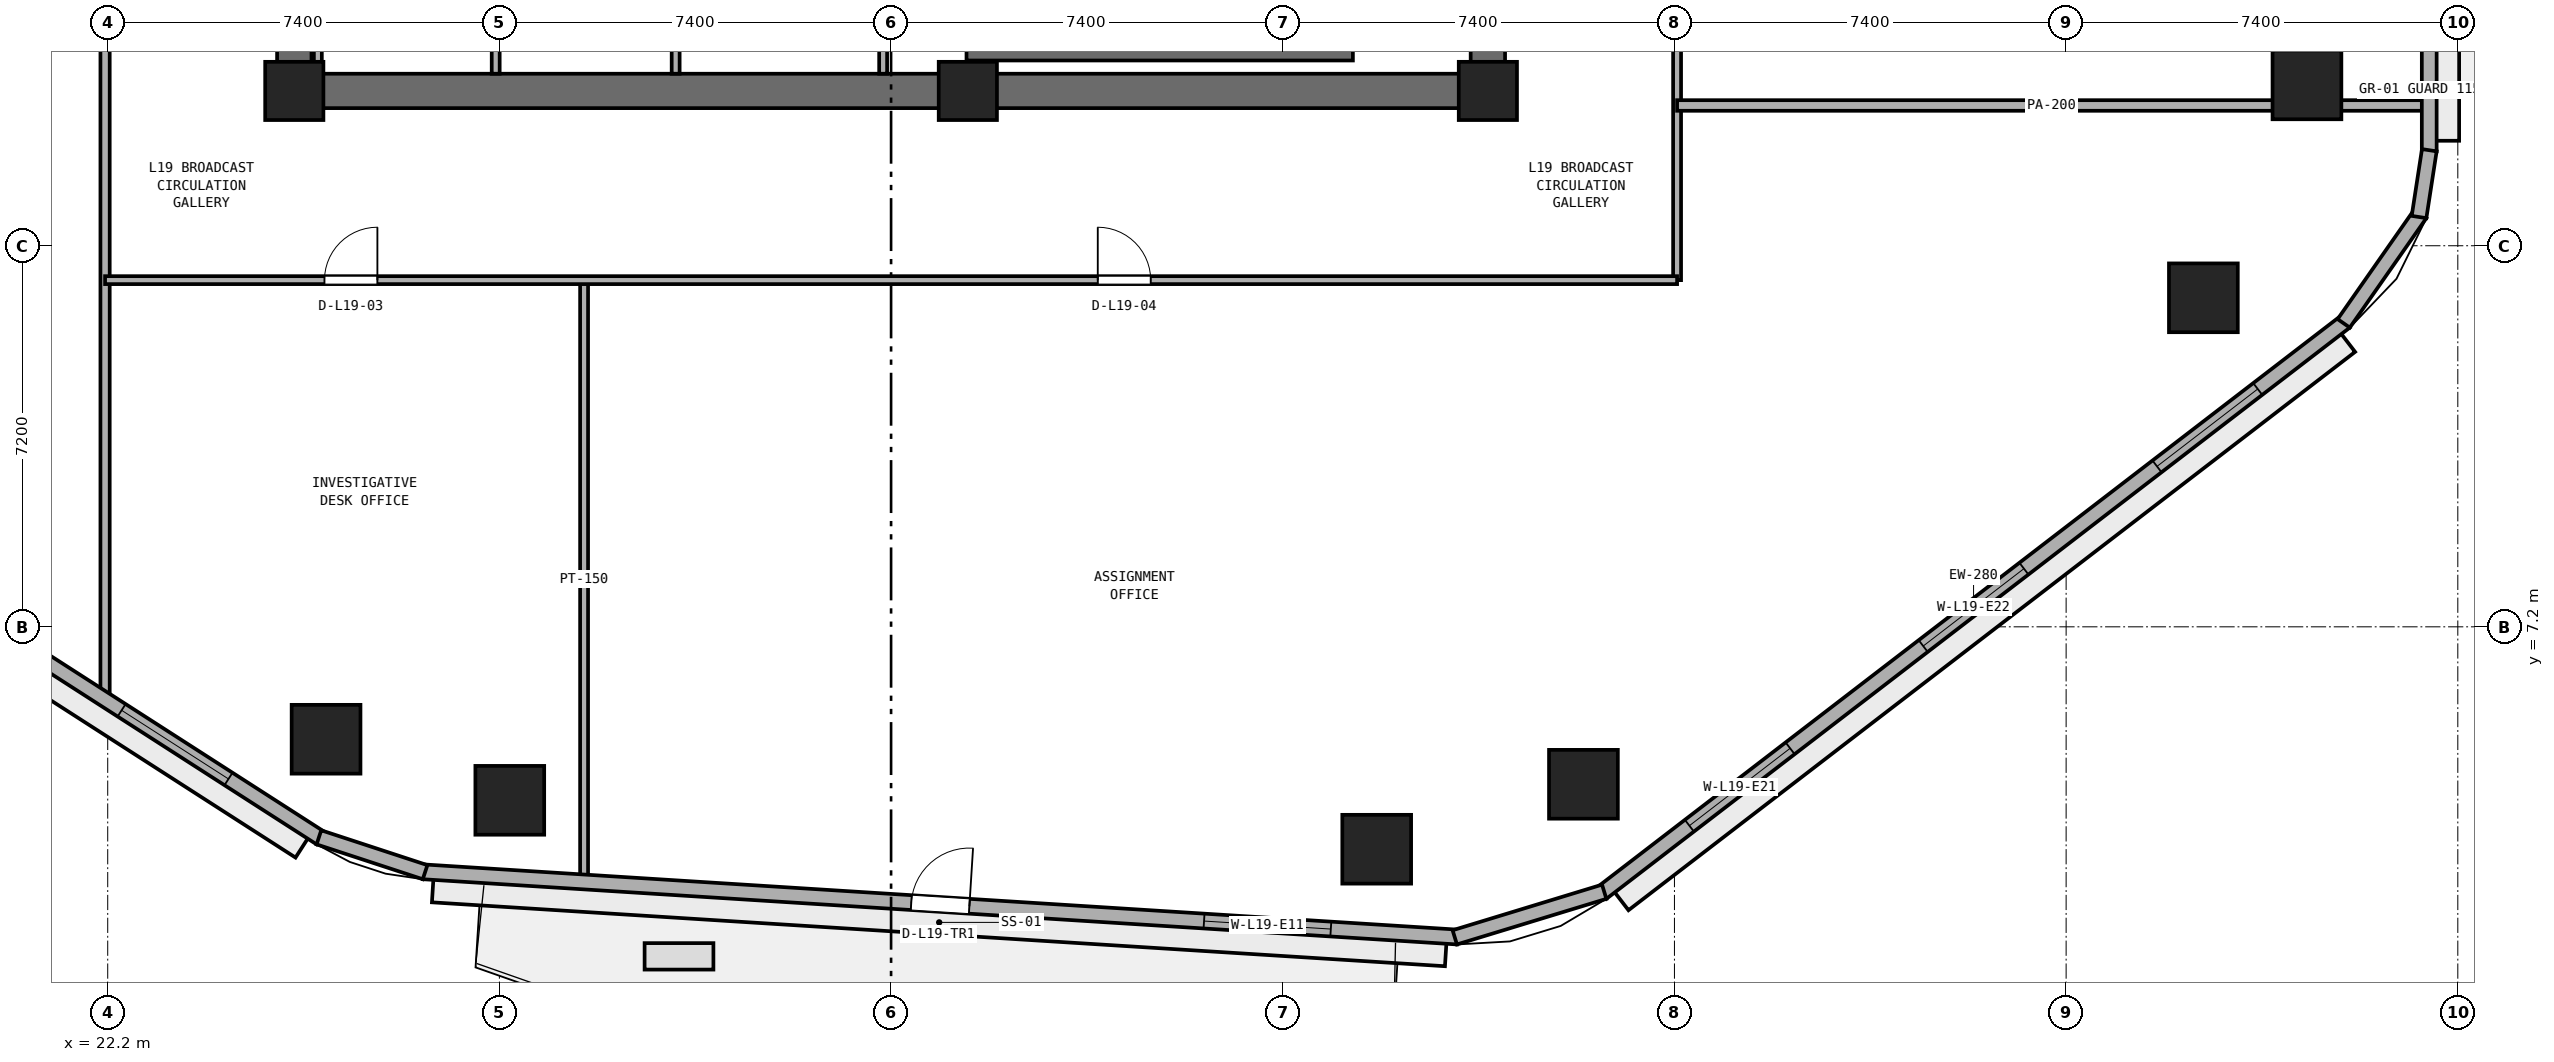
"""IFC4 building model, lengths in metres.
Left out: names, types, materials, properties, quantities, classifications, styles, units other than length and angle.
Written with IfcOpenShell. Run it as: python <this file> out.ifc"""

import sys

from ifc_helpers import new_model, si_unit, direction, frame, frame_2d, origin, origin_2d, place, context, subcontext, project, spatial, rectangle, extrude, element, fill, save


model = new_model("IFC4")
c1 = context("Model", 3, precision=1e-05, world=origin(), true_north=direction((0.0, 1.0)))
c2 = subcontext(c1, "Body", "Model", "MODEL_VIEW")
j1 = project(units=[si_unit("LENGTHUNIT", "METRE"), si_unit("PLANEANGLEUNIT", "RADIAN")], contexts=[c1])
p1 = place(None, origin())
s1 = spatial("IfcSite", under=j1, at=p1, CompositionType="ELEMENT")
p2 = place(p1, origin())
s2 = spatial("IfcBuilding", under=s1, at=p2, CompositionType="ELEMENT")
p3 = place(p2, frame((0.0, 0.0, 78.2)))
s3 = spatial("IfcBuildingStorey", under=s2, at=p3, CompositionType="ELEMENT", Elevation=78.2)
p4 = place(p3, frame((25.4, 17.325, 0.0), z_axis=(0.0, 0.0, 1.0), x_axis=(1.0, 0.0, 0.0)))
e1 = element("IfcWall", 1, at=p4, inside=s3, PredefinedType="SHEAR", context=c2, shape_type="SweptSolid", body=[
    extrude(rectangle(XDim=23.2, YDim=0.65, at=frame_2d((11.6, 0.0))), origin(), (0.0, 0.0, 1.0), 3.525),
])
p5 = place(p3, frame((25.725, 17.65, 0.0), z_axis=(0.0, 0.0, 1.0), x_axis=(0.0, 1.0, 0.0)))
e2 = element("IfcWall", 2, at=p5, inside=s3, PredefinedType="SHEAR", context=c2, shape_type="SweptSolid", body=[
    extrude(rectangle(XDim=15.1, YDim=0.65, at=frame_2d((7.55, 0.0))), origin(), (0.0, 0.0, 1.0), 3.525),
])
p6 = place(p5, frame((6.8, 0.0, 0.0)))
e3 = element("IfcOpeningElement", 3, at=p6, cuts=e2, PredefinedType="OPENING", context=c2, shape_type="SweptSolid", body=[
    extrude(rectangle(XDim=1.5, YDim=2.15, at=frame_2d((0.75, 1.075))), frame((0.0, 0.335, 0.0), z_axis=(0.0, -1.0, 0.0), x_axis=(1.0, 0.0, 0.0)), (0.0, 0.0, 1.0), 0.67),
])
p7 = place(p3, frame((48.275, 17.65, 0.0), z_axis=(0.0, 0.0, 1.0), x_axis=(0.0, 1.0, 0.0)))
e4 = element("IfcWall", 4, at=p7, inside=s3, PredefinedType="SHEAR", context=c2, shape_type="SweptSolid", body=[
    extrude(rectangle(XDim=15.1, YDim=0.65, at=frame_2d((7.55, 0.0))), origin(), (0.0, 0.0, 1.0), 3.525),
])
p8 = place(p7, frame((5.65, 0.0, 0.0)))
e5 = element("IfcOpeningElement", 5, at=p8, cuts=e4, PredefinedType="OPENING", context=c2, shape_type="SweptSolid", body=[
    extrude(rectangle(XDim=1.5, YDim=2.15, at=frame_2d((0.75, 1.075))), frame((0.0, 0.335, 0.0), z_axis=(0.0, -1.0, 0.0), x_axis=(1.0, 0.0, 0.0)), (0.0, 0.0, 1.0), 0.67),
])
for number, where, z_axis, x_axis in (
    (6, (25.725, 17.325, 0.0), (0.0, 0.0, 1.0), (1.0, 0.0, 0.0)),
    (7, (38.45, 17.325, 0.0), (0.0, 0.0, 1.0), (1.0, 0.0, 0.0)),
    (8, (48.275, 17.325, 0.0), (0.0, 0.0, 1.0), (1.0, 0.0, 0.0)),
):
    element("IfcColumn", number, at=place(p3, frame(where, z_axis=z_axis, x_axis=x_axis)), inside=s3, PredefinedType="PILASTER", context=c2, shape_type="SweptSolid", body=[
        extrude(rectangle(XDim=1.1, YDim=1.1, at=origin_2d()), origin(), (0.0, 0.0, 1.0), 3.8),
    ])
for number, where, z_axis, x_axis in (
    (9, (29.796, 3.922, 0.0), (0.0, 0.0, 1.0), (1.0, 0.0, 0.0)),
    (10, (46.175, 2.998, 0.0), (0.0, 0.0, 1.0), (1.0, 0.0, 0.0)),
    (11, (50.081, 4.225, 0.0), (0.0, 0.0, 1.0), (1.0, 0.0, 0.0)),
    (12, (61.793, 13.416, 0.0), (0.0, 0.0, 1.0), (1.0, 0.0, 0.0)),
    (13, (63.75, 17.44, 0.0), (0.0, 0.0, 1.0), (1.0, 0.0, 0.0)),
    (14, (26.325, 5.076, 0.0), (0.0, 0.0, 1.0), (1.0, 0.0, 0.0)),
):
    element("IfcColumn", number, at=place(p3, frame(where, z_axis=z_axis, x_axis=x_axis)), inside=s3, PredefinedType="COLUMN", context=c2, shape_type="SweptSolid", body=[
        extrude(rectangle(XDim=1.3, YDim=1.3, at=origin_2d()), origin(), (0.0, 0.0, 1.0), 3.8),
    ])
p9 = place(p3, frame((38.425, 18.025, 0.0), z_axis=(0.0, 0.0, 1.0), x_axis=(1.0, 0.0, 0.0)))
e15 = element("IfcWall", 15, at=p9, inside=s3, PredefinedType="SHEAR", context=c2, shape_type="SweptSolid", body=[
    extrude(rectangle(XDim=7.3, YDim=0.25, at=frame_2d((3.65, 0.0))), origin(), (0.0, 0.0, 1.0), 3.525),
])
for number, where, z_axis, x_axis in (
    (16, (26.17, 17.65, 0.0), (0.0, 0.0, 1.0), (0.0, 1.0, 0.0)),
    (17, (29.53, 17.65, 0.0), (0.0, 0.0, 1.0), (0.0, 1.0, 0.0)),
    (18, (32.93, 17.65, 0.0), (0.0, 0.0, 1.0), (0.0, 1.0, 0.0)),
    (19, (36.85, 17.65, 0.0), (0.0, 0.0, 1.0), (0.0, 1.0, 0.0)),
):
    element("IfcWall", number, at=place(p3, frame(where, z_axis=z_axis, x_axis=x_axis)), inside=s3, PredefinedType="PARTITIONING", context=c2, shape_type="SweptSolid", body=[
        extrude(rectangle(XDim=2.1, YDim=0.15, at=frame_2d((1.05, 0.0))), origin(), (0.0, 0.0, 1.0), 3.525),
    ])
p10 = place(p3, frame((51.85, 13.75, 0.0), z_axis=(0.0, 0.0, 1.0), x_axis=(0.0, 1.0, 0.0)))
e20 = element("IfcWall", 20, at=p10, inside=s3, PredefinedType="PARTITIONING", context=c2, shape_type="SweptSolid", body=[
    extrude(rectangle(XDim=33.644, YDim=0.15, at=frame_2d((16.822, 0.0))), origin(), (0.0, 0.0, 1.0), 3.525),
])
p11 = place(p10, frame((5.425, 0.0, 0.0)))
e21 = element("IfcOpeningElement", 21, at=p11, cuts=e20, PredefinedType="OPENING", context=c2, shape_type="SweptSolid", body=[
    extrude(rectangle(XDim=0.9, YDim=2.1, at=frame_2d((0.45, 1.05))), frame((0.0, 0.085, 0.0), z_axis=(0.0, -1.0, 0.0), x_axis=(1.0, 0.0, 0.0)), (0.0, 0.0, 1.0), 0.17),
])
p12 = place(p10, frame((15.225, 0.0, 0.0)))
e22 = element("IfcOpeningElement", 22, at=p12, cuts=e20, PredefinedType="OPENING", context=c2, shape_type="SweptSolid", body=[
    extrude(rectangle(XDim=0.9, YDim=2.1, at=frame_2d((0.45, 1.05))), frame((0.0, 0.085, 0.0), z_axis=(0.0, -1.0, 0.0), x_axis=(1.0, 0.0, 0.0)), (0.0, 0.0, 1.0), 0.17),
])
p13 = place(p3, frame((31.2, 2.444, 0.0), z_axis=(0.0, 0.0, 1.0), x_axis=(0.0, 1.0, 0.0)))
e23 = element("IfcWall", 23, at=p13, inside=s3, PredefinedType="PARTITIONING", context=c2, shape_type="SweptSolid", body=[
    extrude(rectangle(XDim=11.306, YDim=0.15, at=frame_2d((5.653, 0.0))), origin(), (0.0, 0.0, 1.0), 3.525),
])
p14 = place(p3, frame((22.15, 5.798, 0.0), z_axis=(0.0, 0.0, 1.0), x_axis=(0.0, 1.0, 0.0)))
e24 = element("IfcWall", 24, at=p14, inside=s3, PredefinedType="PARTITIONING", context=c2, shape_type="SweptSolid", body=[
    extrude(rectangle(XDim=30.852, YDim=0.175, at=frame_2d((15.426, 0.0))), origin(), (0.0, 0.0, 1.0), 3.525),
])
p15 = place(p14, frame((17.302, 0.0, 0.0)))
e25 = element("IfcOpeningElement", 25, at=p15, cuts=e24, PredefinedType="OPENING", context=c2, shape_type="SweptSolid", body=[
    extrude(rectangle(XDim=0.9, YDim=2.1, at=frame_2d((0.45, 1.05))), frame((0.0, 0.097, 0.0), z_axis=(0.0, -1.0, 0.0), x_axis=(1.0, 0.0, 0.0)), (0.0, 0.0, 1.0), 0.195),
])
p16 = place(p3, frame((22.15, 13.75, 0.0), z_axis=(0.0, 0.0, 1.0), x_axis=(1.0, 0.0, 0.0)))
e26 = element("IfcWall", 26, at=p16, inside=s3, PredefinedType="PARTITIONING", context=c2, shape_type="SweptSolid", body=[
    extrude(rectangle(XDim=29.7, YDim=0.15, at=frame_2d((14.85, 0.0))), origin(), (0.0, 0.0, 1.0), 3.525),
])
p17 = place(p16, frame((4.145, 0.0, 0.0)))
e27 = element("IfcOpeningElement", 27, at=p17, cuts=e26, PredefinedType="OPENING", context=c2, shape_type="SweptSolid", body=[
    extrude(rectangle(XDim=1.0, YDim=2.12, at=frame_2d((0.5, 1.06))), frame((0.0, 0.085, 0.0), z_axis=(0.0, -1.0, 0.0), x_axis=(1.0, 0.0, 0.0)), (0.0, 0.0, 1.0), 0.17),
])
p18 = place(p16, frame((18.755, 0.0, 0.0)))
e28 = element("IfcOpeningElement", 28, at=p18, cuts=e26, PredefinedType="OPENING", context=c2, shape_type="SweptSolid", body=[
    extrude(rectangle(XDim=1.0, YDim=2.12, at=frame_2d((0.5, 1.06))), frame((0.0, 0.085, 0.0), z_axis=(0.0, -1.0, 0.0), x_axis=(1.0, 0.0, 0.0)), (0.0, 0.0, 1.0), 0.17),
])
p19 = place(p3, frame((51.85, 17.05, 0.0), z_axis=(0.0, 0.0, 1.0), x_axis=(1.0, 0.0, 0.0)))
e29 = element("IfcWall", 29, at=p19, inside=s3, PredefinedType="PARTITIONING", context=c2, shape_type="SweptSolid", body=[
    extrude(rectangle(XDim=14.145, YDim=0.2, at=frame_2d((7.073, 0.0))), origin(), (0.0, 0.0, 1.0), 3.525),
])
p20 = place(p3, frame((28.161, 2.571, 0.0), z_axis=(0.0, 0.0, 1.0), x_axis=(0.998017288298, -0.06294038654, 0.0)))
e30 = element("IfcWall", 30, at=p20, inside=s3, PredefinedType="STANDARD", context=c2, shape_type="SweptSolid", body=[
    extrude(rectangle(XDim=19.577, YDim=0.28, at=frame_2d((9.789, 0.0))), origin(), (0.0, 0.0, 1.0), 3.525),
])
p21 = place(p20, frame((9.239, 0.0, 0.0)))
e31 = element("IfcOpeningElement", 31, at=p21, cuts=e30, PredefinedType="OPENING", context=c2, shape_type="SweptSolid", body=[
    extrude(rectangle(XDim=1.1, YDim=2.2, at=frame_2d((0.55, 1.1))), frame((0.0, 0.15, 0.0), z_axis=(0.0, -1.0, 0.0), x_axis=(1.0, 0.0, 0.0)), (0.0, 0.0, 1.0), 0.3),
])
p22 = place(p20, frame((14.781, 0.0, 0.9)))
e32 = element("IfcOpeningElement", 32, at=p22, cuts=e30, PredefinedType="OPENING", context=c2, shape_type="SweptSolid", body=[
    extrude(rectangle(XDim=2.4, YDim=1.75, at=frame_2d((1.2, 0.875))), frame((0.0, 0.15, 0.0), z_axis=(0.0, -1.0, 0.0), x_axis=(1.0, 0.0, 0.0)), (0.0, 0.0, 1.0), 0.3),
])
p23 = place(p3, frame((50.429, 2.172, 0.0), z_axis=(0.0, 0.0, 1.0), x_axis=(0.792937466367, 0.609303023488, 0.0)))
e33 = element("IfcWall", 33, at=p23, inside=s3, PredefinedType="STANDARD", context=c2, shape_type="SweptSolid", body=[
    extrude(rectangle(XDim=17.713, YDim=0.28, at=frame_2d((8.856, 0.0))), origin(), (0.0, 0.0, 1.0), 3.525),
])
p24 = place(p23, frame((2.085, 0.0, 0.9)))
e34 = element("IfcOpeningElement", 34, at=p24, cuts=e33, PredefinedType="OPENING", context=c2, shape_type="SweptSolid", body=[
    extrude(rectangle(XDim=2.4, YDim=1.75, at=frame_2d((1.2, 0.875))), frame((0.0, 0.15, 0.0), z_axis=(0.0, -1.0, 0.0), x_axis=(1.0, 0.0, 0.0)), (0.0, 0.0, 1.0), 0.3),
])
p25 = place(p23, frame((7.656, 0.0, 0.9)))
e35 = element("IfcOpeningElement", 35, at=p25, cuts=e33, PredefinedType="OPENING", context=c2, shape_type="SweptSolid", body=[
    extrude(rectangle(XDim=2.4, YDim=1.75, at=frame_2d((1.2, 0.875))), frame((0.0, 0.15, 0.0), z_axis=(0.0, -1.0, 0.0), x_axis=(1.0, 0.0, 0.0)), (0.0, 0.0, 1.0), 0.3),
])
p26 = place(p23, frame((13.227, 0.0, 0.9)))
e36 = element("IfcOpeningElement", 36, at=p26, cuts=e33, PredefinedType="OPENING", context=c2, shape_type="SweptSolid", body=[
    extrude(rectangle(XDim=2.4, YDim=1.75, at=frame_2d((1.2, 0.875))), frame((0.0, 0.15, 0.0), z_axis=(0.0, -1.0, 0.0), x_axis=(1.0, 0.0, 0.0)), (0.0, 0.0, 1.0), 0.3),
])
p27 = place(p3, frame((66.06, 16.183, 0.0), z_axis=(0.0, 0.0, 1.0), x_axis=(0.0, 1.0, 0.0)))
e37 = element("IfcWall", 37, at=p27, inside=s3, PredefinedType="STANDARD", context=c2, shape_type="SweptSolid", body=[
    extrude(rectangle(XDim=19.331, YDim=0.28, at=frame_2d((9.666, 0.0))), origin(), (0.0, 0.0, 1.0), 3.525),
])
p28 = place(p27, frame((9.115, 0.0, 0.0)))
e38 = element("IfcOpeningElement", 38, at=p28, cuts=e37, PredefinedType="OPENING", context=c2, shape_type="SweptSolid", body=[
    extrude(rectangle(XDim=1.1, YDim=2.2, at=frame_2d((0.55, 1.1))), frame((0.0, 0.15, 0.0), z_axis=(0.0, -1.0, 0.0), x_axis=(1.0, 0.0, 0.0)), (0.0, 0.0, 1.0), 0.3),
])
p29 = place(p27, frame((2.355, 0.0, 0.9)))
e39 = element("IfcOpeningElement", 39, at=p29, cuts=e37, PredefinedType="OPENING", context=c2, shape_type="SweptSolid", body=[
    extrude(rectangle(XDim=2.4, YDim=1.75, at=frame_2d((1.2, 0.875))), frame((0.0, 0.15, 0.0), z_axis=(0.0, -1.0, 0.0), x_axis=(1.0, 0.0, 0.0)), (0.0, 0.0, 1.0), 0.3),
])
p30 = place(p27, frame((14.576, 0.0, 0.9)))
e40 = element("IfcOpeningElement", 40, at=p30, cuts=e37, PredefinedType="OPENING", context=c2, shape_type="SweptSolid", body=[
    extrude(rectangle(XDim=2.4, YDim=1.75, at=frame_2d((1.2, 0.875))), frame((0.0, 0.15, 0.0), z_axis=(0.0, -1.0, 0.0), x_axis=(1.0, 0.0, 0.0)), (0.0, 0.0, 1.0), 0.3),
])
p31 = place(p3, frame((11.405, 12.728, 0.0), z_axis=(0.0, 0.0, 1.0), x_axis=(0.841304564637, -0.540561402175, 0.0)))
e41 = element("IfcWall", 41, at=p31, inside=s3, PredefinedType="STANDARD", context=c2, shape_type="SweptSolid", body=[
    extrude(rectangle(XDim=17.612, YDim=0.28, at=frame_2d((8.806, 0.0))), origin(), (0.0, 0.0, 1.0), 3.525),
])
p32 = place(p31, frame((2.069, 0.0, 0.9)))
e42 = element("IfcOpeningElement", 42, at=p32, cuts=e41, PredefinedType="OPENING", context=c2, shape_type="SweptSolid", body=[
    extrude(rectangle(XDim=2.4, YDim=1.75, at=frame_2d((1.2, 0.875))), frame((0.0, 0.15, 0.0), z_axis=(0.0, -1.0, 0.0), x_axis=(1.0, 0.0, 0.0)), (0.0, 0.0, 1.0), 0.3),
])
p33 = place(p31, frame((7.606, 0.0, 0.9)))
e43 = element("IfcOpeningElement", 43, at=p33, cuts=e41, PredefinedType="OPENING", context=c2, shape_type="SweptSolid", body=[
    extrude(rectangle(XDim=2.4, YDim=1.75, at=frame_2d((1.2, 0.875))), frame((0.0, 0.15, 0.0), z_axis=(0.0, -1.0, 0.0), x_axis=(1.0, 0.0, 0.0)), (0.0, 0.0, 1.0), 0.3),
])
p34 = place(p31, frame((13.143, 0.0, 0.9)))
e44 = element("IfcOpeningElement", 44, at=p34, cuts=e41, PredefinedType="OPENING", context=c2, shape_type="SweptSolid", body=[
    extrude(rectangle(XDim=2.4, YDim=1.75, at=frame_2d((1.2, 0.875))), frame((0.0, 0.15, 0.0), z_axis=(0.0, -1.0, 0.0), x_axis=(1.0, 0.0, 0.0)), (0.0, 0.0, 1.0), 0.3),
])
p35 = place(p3, frame((47.65, 1.333, 0.0), z_axis=(0.0, 0.0, 1.0), x_axis=(0.956461287977, 0.291859220516, 0.0)))
e45 = element("IfcWall", 45, at=p35, inside=s3, PredefinedType="STANDARD", context=c2, shape_type="SweptSolid", body=[
    extrude(rectangle(XDim=2.952, YDim=0.28, at=frame_2d((1.476, 0.0))), origin(), (0.0, 0.0, 1.0), 3.525),
])
p36 = place(p3, frame((64.444, 12.933, 0.0), z_axis=(0.0, 0.0, 1.0), x_axis=(0.573176686443, 0.819431806875, 0.0)))
e46 = element("IfcWall", 46, at=p36, inside=s3, PredefinedType="STANDARD", context=c2, shape_type="SweptSolid", body=[
    extrude(rectangle(XDim=2.524, YDim=0.28, at=frame_2d((1.262, 0.0))), origin(), (0.0, 0.0, 1.0), 3.525),
])
p37 = place(p3, frame((65.867, 14.943, 0.0), z_axis=(0.0, 0.0, 1.0), x_axis=(0.152014078361, 0.988378328364, 0.0)))
e47 = element("IfcWall", 47, at=p37, inside=s3, PredefinedType="STANDARD", context=c2, shape_type="SweptSolid", body=[
    extrude(rectangle(XDim=1.277, YDim=0.28, at=frame_2d((0.638, 0.0))), origin(), (0.0, 0.0, 1.0), 3.525),
])
p38 = place(p3, frame((26.19, 3.223, 0.0), z_axis=(0.0, 0.0, 1.0), x_axis=(0.95016442175, -0.311749212734, 0.0)))
e48 = element("IfcWall", 48, at=p38, inside=s3, PredefinedType="STANDARD", context=c2, shape_type="SweptSolid", body=[
    extrude(rectangle(XDim=2.111, YDim=0.28, at=frame_2d((1.056, 0.0))), origin(), (0.0, 0.0, 1.0), 3.525),
])
p39 = place(p17, origin())
e49 = element("IfcDoor", 49, at=p39, inside=s3, OperationType="SINGLE_SWING_RIGHT", PredefinedType="DOOR", context=c2, shape_type="SweptSolid", body=[
    extrude(rectangle(XDim=1.0, YDim=2.12, at=frame_2d((0.5, 1.06))), frame((0.0, 0.025, 0.0), z_axis=(0.0, -1.0, 0.0), x_axis=(1.0, 0.0, 0.0)), (0.0, 0.0, 1.0), 0.05),
])
fill(e27, e49)
p40 = place(p18, origin())
e50 = element("IfcDoor", 50, at=p40, inside=s3, OperationType="SINGLE_SWING_LEFT", PredefinedType="DOOR", context=c2, shape_type="SweptSolid", body=[
    extrude(rectangle(XDim=1.0, YDim=2.12, at=frame_2d((0.5, 1.06))), frame((0.0, 0.025, 0.0), z_axis=(0.0, -1.0, 0.0), x_axis=(1.0, 0.0, 0.0)), (0.0, 0.0, 1.0), 0.05),
])
fill(e28, e50)
p41 = place(p21, origin())
e51 = element("IfcDoor", 51, at=p41, inside=s3, OperationType="SINGLE_SWING_RIGHT", PredefinedType="DOOR", context=c2, shape_type="SweptSolid", body=[
    extrude(rectangle(XDim=1.1, YDim=2.2, at=frame_2d((0.55, 1.1))), frame((0.0, 0.025, 0.0), z_axis=(0.0, -1.0, 0.0), x_axis=(1.0, 0.0, 0.0)), (0.0, 0.0, 1.0), 0.05),
])
fill(e31, e51)
p42 = place(p22, origin())
e52 = element("IfcWindow", 52, at=p42, inside=s3, PartitioningType="SINGLE_PANEL", PredefinedType="WINDOW", context=c2, shape_type="SweptSolid", body=[
    extrude(rectangle(XDim=2.4, YDim=1.75, at=frame_2d((1.2, 0.875))), frame((0.0, 0.03, 0.0), z_axis=(0.0, -1.0, 0.0), x_axis=(1.0, 0.0, 0.0)), (0.0, 0.0, 1.0), 0.06),
])
fill(e32, e52)
p43 = place(p24, origin())
e53 = element("IfcWindow", 53, at=p43, inside=s3, PartitioningType="SINGLE_PANEL", PredefinedType="WINDOW", context=c2, shape_type="SweptSolid", body=[
    extrude(rectangle(XDim=2.4, YDim=1.75, at=frame_2d((1.2, 0.875))), frame((0.0, 0.03, 0.0), z_axis=(0.0, -1.0, 0.0), x_axis=(1.0, 0.0, 0.0)), (0.0, 0.0, 1.0), 0.06),
])
fill(e34, e53)
p44 = place(p25, origin())
e54 = element("IfcWindow", 54, at=p44, inside=s3, PartitioningType="SINGLE_PANEL", PredefinedType="WINDOW", context=c2, shape_type="SweptSolid", body=[
    extrude(rectangle(XDim=2.4, YDim=1.75, at=frame_2d((1.2, 0.875))), frame((0.0, 0.03, 0.0), z_axis=(0.0, -1.0, 0.0), x_axis=(1.0, 0.0, 0.0)), (0.0, 0.0, 1.0), 0.06),
])
fill(e35, e54)
p45 = place(p26, origin())
e55 = element("IfcWindow", 55, at=p45, inside=s3, PartitioningType="SINGLE_PANEL", PredefinedType="WINDOW", context=c2, shape_type="SweptSolid", body=[
    extrude(rectangle(XDim=2.4, YDim=1.75, at=frame_2d((1.2, 0.875))), frame((0.0, 0.03, 0.0), z_axis=(0.0, -1.0, 0.0), x_axis=(1.0, 0.0, 0.0)), (0.0, 0.0, 1.0), 0.06),
])
fill(e36, e55)
p46 = place(p34, origin())
e56 = element("IfcWindow", 56, at=p46, inside=s3, PartitioningType="SINGLE_PANEL", PredefinedType="WINDOW", context=c2, shape_type="SweptSolid", body=[
    extrude(rectangle(XDim=2.4, YDim=1.75, at=frame_2d((1.2, 0.875))), frame((0.0, 0.03, 0.0), z_axis=(0.0, -1.0, 0.0), x_axis=(1.0, 0.0, 0.0)), (0.0, 0.0, 1.0), 0.06),
])
fill(e44, e56)
save(model, sys.argv[1])
